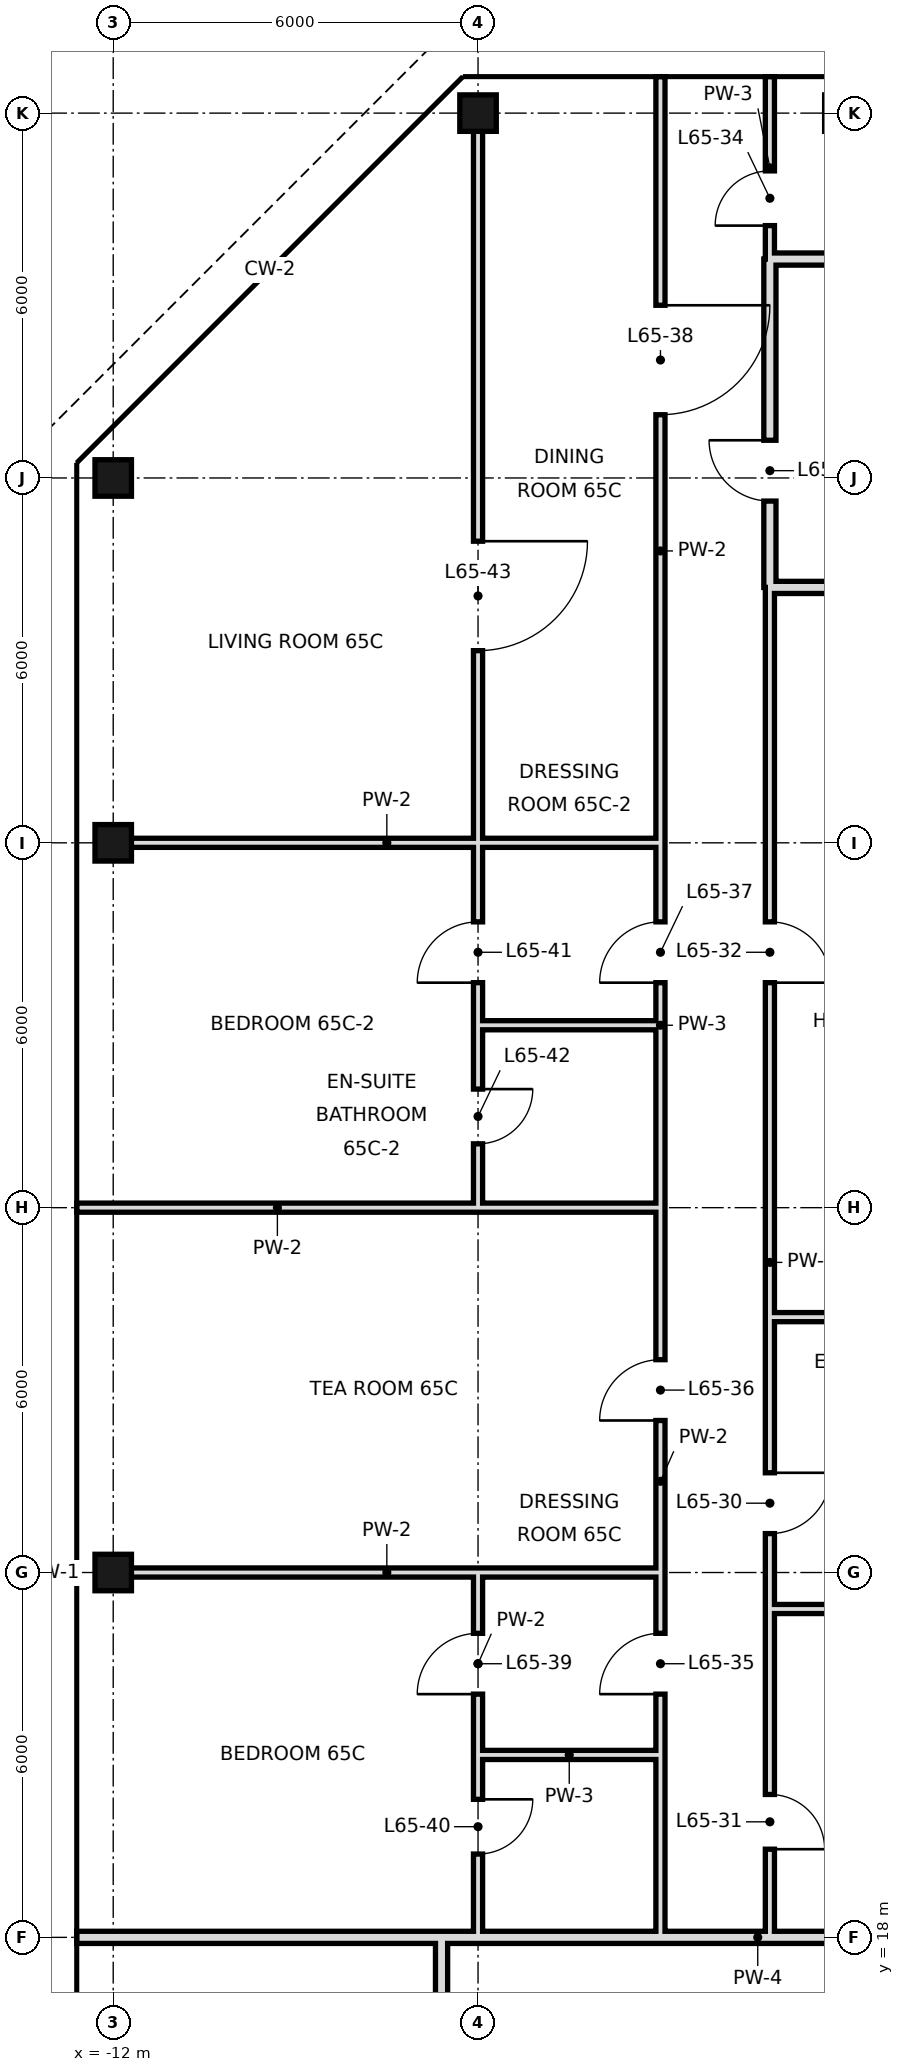
"""IFC4 building model, lengths in metres.
Left out: names, types, materials, properties, quantities, classifications, styles, units other than length and angle.
Written with IfcOpenShell. Run it as: python <this file> out.ifc"""

import sys

from ifc_helpers import new_model, si_unit, direction, frame, frame_2d, origin, origin_2d, place, context, subcontext, project, spatial, rectangle, hollow_rectangle, extrude, element, fill, save


model = new_model("IFC4")
c1 = context("Model", 3, precision=1e-05, world=origin(), true_north=direction((0.0, 1.0)))
c2 = subcontext(c1, "Body", "Model", "MODEL_VIEW")
j1 = project(units=[si_unit("LENGTHUNIT", "METRE"), si_unit("PLANEANGLEUNIT", "RADIAN")], contexts=[c1])
p1 = place(None, origin())
s1 = spatial("IfcSite", under=j1, at=p1, CompositionType="ELEMENT")
p2 = place(p1, origin())
s2 = spatial("IfcBuilding", under=s1, at=p2, CompositionType="ELEMENT")
p3 = place(p2, frame((0.0, 0.0, 273.8)))
s3 = spatial("IfcBuildingStorey", under=s2, at=p3, CompositionType="ELEMENT", Elevation=273.8)
for number, where, z_axis, x_axis in (
    (1, (-12.0, 24.0, 0.0), (0.0, 0.0, 1.0), (1.0, 0.0, 0.0)),
    (2, (-12.0, 36.0, 0.0), (0.0, 0.0, 1.0), (1.0, 0.0, 0.0)),
    (3, (-12.0, 42.0, 0.0), (0.0, 0.0, 1.0), (1.0, 0.0, 0.0)),
    (4, (-6.0, 48.0, 0.0), (0.0, 0.0, 1.0), (1.0, 0.0, 0.0)),
):
    element("IfcColumn", number, at=place(p3, frame(where, z_axis=z_axis, x_axis=x_axis)), inside=s3, PredefinedType="COLUMN", context=c2, shape_type="SweptSolid", body=[
        extrude(hollow_rectangle(XDim=0.6, YDim=0.6, WallThickness=0.028, at=origin_2d()), origin(), (0.0, 0.0, 1.0), 3.6),
    ])
p4 = place(p3, frame((-1.2, 40.2, 0.0), z_axis=(0.0, 0.0, 1.0), x_axis=(0.0, 1.0, 0.0)))
e5 = element("IfcWall", 5, at=p4, inside=s3, PredefinedType="SOLIDWALL", context=c2, shape_type="SweptSolid", body=[
    extrude(rectangle(XDim=5.4, YDim=0.2, at=frame_2d((2.7, 0.0))), origin(), (0.0, 0.0, 1.0), 2.72),
])
p5 = place(p4, frame((1.42, 0.0, 0.0)))
e6 = element("IfcOpeningElement", 6, at=p5, cuts=e5, PredefinedType="OPENING", context=c2, shape_type="SweptSolid", body=[
    extrude(rectangle(XDim=1.0, YDim=2.4, at=frame_2d((0.5, 1.2))), frame((0.0, 0.11, 0.0), z_axis=(0.0, -1.0, 0.0), x_axis=(1.0, 0.0, 0.0)), (0.0, 0.0, 1.0), 0.22),
])
p6 = place(p3, frame((-1.2, 18.0, 0.0), z_axis=(0.0, 0.0, 1.0), x_axis=(0.0, 1.0, 0.0)))
e7 = element("IfcWall", 7, at=p6, inside=s3, PredefinedType="PARTITIONING", context=c2, shape_type="SweptSolid", body=[
    extrude(rectangle(XDim=22.2, YDim=0.15, at=frame_2d((11.1, 0.0))), origin(), (0.0, 0.0, 1.0), 3.42),
])
p7 = place(p6, frame((6.64, 0.0, 0.0)))
e8 = element("IfcOpeningElement", 8, at=p7, cuts=e7, PredefinedType="OPENING", context=c2, shape_type="SweptSolid", body=[
    extrude(rectangle(XDim=1.0, YDim=2.4, at=frame_2d((0.5, 1.2))), frame((0.0, 0.085, 0.0), z_axis=(0.0, -1.0, 0.0), x_axis=(1.0, 0.0, 0.0)), (0.0, 0.0, 1.0), 0.17),
])
p8 = place(p6, frame((1.45, 0.0, 0.0)))
e9 = element("IfcOpeningElement", 9, at=p8, cuts=e7, PredefinedType="OPENING", context=c2, shape_type="SweptSolid", body=[
    extrude(rectangle(XDim=0.9, YDim=2.1, at=frame_2d((0.45, 1.05))), frame((0.0, 0.085, 0.0), z_axis=(0.0, -1.0, 0.0), x_axis=(1.0, 0.0, 0.0)), (0.0, 0.0, 1.0), 0.17),
])
p9 = place(p6, frame((15.7, 0.0, 0.0)))
e10 = element("IfcOpeningElement", 10, at=p9, cuts=e7, PredefinedType="OPENING", context=c2, shape_type="SweptSolid", body=[
    extrude(rectangle(XDim=1.0, YDim=2.4, at=frame_2d((0.5, 1.2))), frame((0.0, 0.085, 0.0), z_axis=(0.0, -1.0, 0.0), x_axis=(1.0, 0.0, 0.0)), (0.0, 0.0, 1.0), 0.17),
])
p10 = place(p3, frame((-1.2, 45.6, 0.0), z_axis=(0.0, 0.0, 1.0), x_axis=(0.0, 1.0, 0.0)))
e11 = element("IfcWall", 11, at=p10, inside=s3, PredefinedType="PARTITIONING", context=c2, shape_type="SweptSolid", body=[
    extrude(rectangle(XDim=3.0, YDim=0.15, at=frame_2d((1.5, 0.0))), origin(), (0.0, 0.0, 1.0), 3.42),
])
p11 = place(p10, frame((0.55, 0.0, 0.0)))
e12 = element("IfcOpeningElement", 12, at=p11, cuts=e11, PredefinedType="OPENING", context=c2, shape_type="SweptSolid", body=[
    extrude(rectangle(XDim=0.9, YDim=2.4, at=frame_2d((0.45, 1.2))), frame((0.0, 0.085, 0.0), z_axis=(0.0, -1.0, 0.0), x_axis=(1.0, 0.0, 0.0)), (0.0, 0.0, 1.0), 0.17),
])
p12 = place(p3, frame((-3.0, 21.0, 0.0), z_axis=(0.0, 0.0, 1.0), x_axis=(0.0, 1.0, 0.0)))
e13 = element("IfcWall", 13, at=p12, inside=s3, PredefinedType="PARTITIONING", context=c2, shape_type="SweptSolid", body=[
    extrude(rectangle(XDim=9.0, YDim=0.15, at=frame_2d((4.5, 0.0))), origin(), (0.0, 0.0, 1.0), 3.42),
])
p13 = place(p12, frame((1.0, 0.0, 0.0)))
e14 = element("IfcOpeningElement", 14, at=p13, cuts=e13, PredefinedType="OPENING", context=c2, shape_type="SweptSolid", body=[
    extrude(rectangle(XDim=1.0, YDim=2.4, at=frame_2d((0.5, 1.2))), frame((0.0, 0.085, 0.0), z_axis=(0.0, -1.0, 0.0), x_axis=(1.0, 0.0, 0.0)), (0.0, 0.0, 1.0), 0.17),
])
p14 = place(p12, frame((5.5, 0.0, 0.0)))
e15 = element("IfcOpeningElement", 15, at=p14, cuts=e13, PredefinedType="OPENING", context=c2, shape_type="SweptSolid", body=[
    extrude(rectangle(XDim=1.0, YDim=2.4, at=frame_2d((0.5, 1.2))), frame((0.0, 0.085, 0.0), z_axis=(0.0, -1.0, 0.0), x_axis=(1.0, 0.0, 0.0)), (0.0, 0.0, 1.0), 0.17),
])
p15 = place(p3, frame((-3.0, 33.0, 0.0), z_axis=(0.0, 0.0, 1.0), x_axis=(0.0, 1.0, 0.0)))
e16 = element("IfcWall", 16, at=p15, inside=s3, PredefinedType="PARTITIONING", context=c2, shape_type="SweptSolid", body=[
    extrude(rectangle(XDim=15.6, YDim=0.15, at=frame_2d((7.8, 0.0))), origin(), (0.0, 0.0, 1.0), 3.42),
])
p16 = place(p15, frame((0.7, 0.0, 0.0)))
e17 = element("IfcOpeningElement", 17, at=p16, cuts=e16, PredefinedType="OPENING", context=c2, shape_type="SweptSolid", body=[
    extrude(rectangle(XDim=1.0, YDim=2.4, at=frame_2d((0.5, 1.2))), frame((0.0, 0.085, 0.0), z_axis=(0.0, -1.0, 0.0), x_axis=(1.0, 0.0, 0.0)), (0.0, 0.0, 1.0), 0.17),
])
p17 = place(p15, frame((10.04, 0.0, 0.0)))
e18 = element("IfcOpeningElement", 18, at=p17, cuts=e16, PredefinedType="OPENING", context=c2, shape_type="SweptSolid", body=[
    extrude(rectangle(XDim=1.8, YDim=2.4, at=frame_2d((0.9, 1.2))), frame((0.0, 0.085, 0.0), z_axis=(0.0, -1.0, 0.0), x_axis=(1.0, 0.0, 0.0)), (0.0, 0.0, 1.0), 0.17),
])
for number, where, z_axis, x_axis in (
    (19, (-3.0, 18.0, 0.0), (0.0, 0.0, 1.0), (0.0, 1.0, 0.0)),
    (20, (-3.0, 30.0, 0.0), (0.0, 0.0, 1.0), (0.0, 1.0, 0.0)),
):
    element("IfcWall", number, at=place(p3, frame(where, z_axis=z_axis, x_axis=x_axis)), inside=s3, PredefinedType="PARTITIONING", context=c2, shape_type="SweptSolid", body=[
        extrude(rectangle(XDim=3.0, YDim=0.15, at=frame_2d((1.5, 0.0))), origin(), (0.0, 0.0, 1.0), 3.42),
    ])
p18 = place(p3, frame((-6.0, 21.0, 0.0), z_axis=(0.0, 0.0, 1.0), x_axis=(0.0, 1.0, 0.0)))
e21 = element("IfcWall", 21, at=p18, inside=s3, PredefinedType="PARTITIONING", context=c2, shape_type="SweptSolid", body=[
    extrude(rectangle(XDim=3.0, YDim=0.15, at=frame_2d((1.5, 0.0))), origin(), (0.0, 0.0, 1.0), 3.42),
])
p19 = place(p18, frame((1.0, 0.0, 0.0)))
e22 = element("IfcOpeningElement", 22, at=p19, cuts=e21, PredefinedType="OPENING", context=c2, shape_type="SweptSolid", body=[
    extrude(rectangle(XDim=1.0, YDim=2.4, at=frame_2d((0.5, 1.2))), frame((0.0, 0.085, 0.0), z_axis=(0.0, -1.0, 0.0), x_axis=(1.0, 0.0, 0.0)), (0.0, 0.0, 1.0), 0.17),
])
p20 = place(p3, frame((-6.0, 33.0, 0.0), z_axis=(0.0, 0.0, 1.0), x_axis=(0.0, 1.0, 0.0)))
e23 = element("IfcWall", 23, at=p20, inside=s3, PredefinedType="PARTITIONING", context=c2, shape_type="SweptSolid", body=[
    extrude(rectangle(XDim=15.0, YDim=0.15, at=frame_2d((7.5, 0.0))), origin(), (0.0, 0.0, 1.0), 3.42),
])
p21 = place(p20, frame((0.7, 0.0, 0.0)))
e24 = element("IfcOpeningElement", 24, at=p21, cuts=e23, PredefinedType="OPENING", context=c2, shape_type="SweptSolid", body=[
    extrude(rectangle(XDim=1.0, YDim=2.4, at=frame_2d((0.5, 1.2))), frame((0.0, 0.085, 0.0), z_axis=(0.0, -1.0, 0.0), x_axis=(1.0, 0.0, 0.0)), (0.0, 0.0, 1.0), 0.17),
])
p22 = place(p20, frame((6.16, 0.0, 0.0)))
e25 = element("IfcOpeningElement", 25, at=p22, cuts=e23, PredefinedType="OPENING", context=c2, shape_type="SweptSolid", body=[
    extrude(rectangle(XDim=1.8, YDim=2.4, at=frame_2d((0.9, 1.2))), frame((0.0, 0.085, 0.0), z_axis=(0.0, -1.0, 0.0), x_axis=(1.0, 0.0, 0.0)), (0.0, 0.0, 1.0), 0.17),
])
p23 = place(p3, frame((-6.0, 18.0, 0.0), z_axis=(0.0, 0.0, 1.0), x_axis=(0.0, 1.0, 0.0)))
e26 = element("IfcWall", 26, at=p23, inside=s3, PredefinedType="PARTITIONING", context=c2, shape_type="SweptSolid", body=[
    extrude(rectangle(XDim=3.0, YDim=0.15, at=frame_2d((1.5, 0.0))), origin(), (0.0, 0.0, 1.0), 3.42),
])
p24 = place(p23, frame((1.37, 0.0, 0.0)))
e27 = element("IfcOpeningElement", 27, at=p24, cuts=e26, PredefinedType="OPENING", context=c2, shape_type="SweptSolid", body=[
    extrude(rectangle(XDim=0.9, YDim=2.4, at=frame_2d((0.45, 1.2))), frame((0.0, 0.085, 0.0), z_axis=(0.0, -1.0, 0.0), x_axis=(1.0, 0.0, 0.0)), (0.0, 0.0, 1.0), 0.17),
])
p25 = place(p3, frame((-6.0, 30.0, 0.0), z_axis=(0.0, 0.0, 1.0), x_axis=(0.0, 1.0, 0.0)))
e28 = element("IfcWall", 28, at=p25, inside=s3, PredefinedType="PARTITIONING", context=c2, shape_type="SweptSolid", body=[
    extrude(rectangle(XDim=3.0, YDim=0.15, at=frame_2d((1.5, 0.0))), origin(), (0.0, 0.0, 1.0), 3.42),
])
p26 = place(p25, frame((1.05, 0.0, 0.0)))
e29 = element("IfcOpeningElement", 29, at=p26, cuts=e28, PredefinedType="OPENING", context=c2, shape_type="SweptSolid", body=[
    extrude(rectangle(XDim=0.9, YDim=2.4, at=frame_2d((0.45, 1.2))), frame((0.0, 0.085, 0.0), z_axis=(0.0, -1.0, 0.0), x_axis=(1.0, 0.0, 0.0)), (0.0, 0.0, 1.0), 0.17),
])
p27 = place(p3, frame((-6.6, 10.8, 0.0), z_axis=(0.0, 0.0, 1.0), x_axis=(0.0, 1.0, 0.0)))
e30 = element("IfcWall", 30, at=p27, inside=s3, PredefinedType="SOLIDWALL", context=c2, shape_type="SweptSolid", body=[
    extrude(rectangle(XDim=7.2, YDim=0.2, at=frame_2d((3.6, 0.0))), origin(), (0.0, 0.0, 1.0), 2.72),
])
p28 = place(p3, frame((-12.6, 18.0, 0.0), z_axis=(0.0, 0.0, 1.0), x_axis=(1.0, 0.0, 0.0)))
e31 = element("IfcWall", 31, at=p28, inside=s3, PredefinedType="SOLIDWALL", context=c2, shape_type="SweptSolid", body=[
    extrude(rectangle(XDim=6.0, YDim=0.2, at=frame_2d((3.0, 0.0))), origin(), (0.0, 0.0, 1.0), 2.72),
])
p29 = place(p3, frame((-6.6, 18.0, 0.0), z_axis=(0.0, 0.0, 1.0), x_axis=(1.0, 0.0, 0.0)))
e32 = element("IfcWall", 32, at=p29, inside=s3, PredefinedType="SOLIDWALL", context=c2, shape_type="SweptSolid", body=[
    extrude(rectangle(XDim=9.7, YDim=0.2, at=frame_2d((4.85, 0.0))), origin(), (0.0, 0.0, 1.0), 2.72),
])
p30 = place(p3, frame((-6.0, 21.0, 0.0), z_axis=(0.0, 0.0, 1.0), x_axis=(1.0, 0.0, 0.0)))
e33 = element("IfcWall", 33, at=p30, inside=s3, PredefinedType="PARTITIONING", context=c2, shape_type="SweptSolid", body=[
    extrude(rectangle(XDim=3.0, YDim=0.15, at=frame_2d((1.5, 0.0))), origin(), (0.0, 0.0, 1.0), 3.42),
])
p31 = place(p3, frame((-1.2, 23.4, 0.0), z_axis=(0.0, 0.0, 1.0), x_axis=(1.0, 0.0, 0.0)))
e34 = element("IfcWall", 34, at=p31, inside=s3, PredefinedType="PARTITIONING", context=c2, shape_type="SweptSolid", body=[
    extrude(rectangle(XDim=4.3, YDim=0.15, at=frame_2d((2.15, 0.0))), origin(), (0.0, 0.0, 1.0), 3.42),
])
p32 = place(p3, frame((-12.0, 24.0, 0.0), z_axis=(0.0, 0.0, 1.0), x_axis=(1.0, 0.0, 0.0)))
e35 = element("IfcWall", 35, at=p32, inside=s3, PredefinedType="PARTITIONING", context=c2, shape_type="SweptSolid", body=[
    extrude(rectangle(XDim=9.0, YDim=0.15, at=frame_2d((4.5, 0.0))), origin(), (0.0, 0.0, 1.0), 2.72),
])
p33 = place(p3, frame((-1.2, 28.2, 0.0), z_axis=(0.0, 0.0, 1.0), x_axis=(1.0, 0.0, 0.0)))
e36 = element("IfcWall", 36, at=p33, inside=s3, PredefinedType="PARTITIONING", context=c2, shape_type="SweptSolid", body=[
    extrude(rectangle(XDim=4.3, YDim=0.15, at=frame_2d((2.15, 0.0))), origin(), (0.0, 0.0, 1.0), 3.42),
])
p34 = place(p3, frame((-12.6, 30.0, 0.0), z_axis=(0.0, 0.0, 1.0), x_axis=(1.0, 0.0, 0.0)))
e37 = element("IfcWall", 37, at=p34, inside=s3, PredefinedType="PARTITIONING", context=c2, shape_type="SweptSolid", body=[
    extrude(rectangle(XDim=6.6, YDim=0.15, at=frame_2d((3.3, 0.0))), origin(), (0.0, 0.0, 1.0), 2.72),
])
p35 = place(p3, frame((-6.0, 30.0, 0.0), z_axis=(0.0, 0.0, 1.0), x_axis=(1.0, 0.0, 0.0)))
e38 = element("IfcWall", 38, at=p35, inside=s3, PredefinedType="PARTITIONING", context=c2, shape_type="SweptSolid", body=[
    extrude(rectangle(XDim=3.0, YDim=0.15, at=frame_2d((1.5, 0.0))), origin(), (0.0, 0.0, 1.0), 2.72),
])
p36 = place(p3, frame((-6.0, 33.0, 0.0), z_axis=(0.0, 0.0, 1.0), x_axis=(1.0, 0.0, 0.0)))
e39 = element("IfcWall", 39, at=p36, inside=s3, PredefinedType="PARTITIONING", context=c2, shape_type="SweptSolid", body=[
    extrude(rectangle(XDim=3.0, YDim=0.15, at=frame_2d((1.5, 0.0))), origin(), (0.0, 0.0, 1.0), 3.42),
])
p37 = place(p3, frame((-12.0, 36.0, 0.0), z_axis=(0.0, 0.0, 1.0), x_axis=(1.0, 0.0, 0.0)))
e40 = element("IfcWall", 40, at=p37, inside=s3, PredefinedType="PARTITIONING", context=c2, shape_type="SweptSolid", body=[
    extrude(rectangle(XDim=9.0, YDim=0.15, at=frame_2d((4.5, 0.0))), origin(), (0.0, 0.0, 1.0), 2.72),
])
for number, where, z_axis, x_axis in (
    (41, (-1.2, 40.2, 0.0), (0.0, 0.0, 1.0), (1.0, 0.0, 0.0)),
    (42, (-1.2, 45.6, 0.0), (0.0, 0.0, 1.0), (1.0, 0.0, 0.0)),
):
    element("IfcWall", number, at=place(p3, frame(where, z_axis=z_axis, x_axis=x_axis)), inside=s3, PredefinedType="SOLIDWALL", context=c2, shape_type="SweptSolid", body=[
        extrude(rectangle(XDim=4.3, YDim=0.2, at=frame_2d((2.15, 0.0))), origin(), (0.0, 0.0, 1.0), 2.72),
    ])
p38 = place(p7, origin())
e43 = element("IfcDoor", 43, at=p38, inside=s3, OperationType="SINGLE_SWING_RIGHT", PredefinedType="DOOR", context=c2, shape_type="SweptSolid", body=[
    extrude(rectangle(XDim=1.0, YDim=2.4, at=frame_2d((0.5, 1.2))), frame((0.0, 0.025, 0.0), z_axis=(0.0, -1.0, 0.0), x_axis=(1.0, 0.0, 0.0)), (0.0, 0.0, 1.0), 0.05),
])
fill(e8, e43)
p39 = place(p8, frame((0.9, 0.0, 0.0), z_axis=(0.0, 0.0, 1.0), x_axis=(-1.0, 0.0, 0.0)))
e44 = element("IfcDoor", 44, at=p39, inside=s3, OperationType="SINGLE_SWING_RIGHT", PredefinedType="DOOR", context=c2, shape_type="SweptSolid", body=[
    extrude(rectangle(XDim=0.9, YDim=2.1, at=frame_2d((0.45, 1.05))), frame((0.0, 0.025, 0.0), z_axis=(0.0, -1.0, 0.0), x_axis=(1.0, 0.0, 0.0)), (0.0, 0.0, 1.0), 0.05),
])
fill(e9, e44)
p40 = place(p9, frame((1.0, 0.0, 0.0), z_axis=(0.0, 0.0, 1.0), x_axis=(-1.0, 0.0, 0.0)))
e45 = element("IfcDoor", 45, at=p40, inside=s3, OperationType="SINGLE_SWING_RIGHT", PredefinedType="DOOR", context=c2, shape_type="SweptSolid", body=[
    extrude(rectangle(XDim=1.0, YDim=2.4, at=frame_2d((0.5, 1.2))), frame((0.0, 0.025, 0.0), z_axis=(0.0, -1.0, 0.0), x_axis=(1.0, 0.0, 0.0)), (0.0, 0.0, 1.0), 0.05),
])
fill(e10, e45)
p41 = place(p5, frame((1.0, 0.0, 0.0), z_axis=(0.0, 0.0, 1.0), x_axis=(-1.0, 0.0, 0.0)))
e46 = element("IfcDoor", 46, at=p41, inside=s3, OperationType="SINGLE_SWING_LEFT", PredefinedType="DOOR", context=c2, shape_type="SweptSolid", body=[
    extrude(rectangle(XDim=1.0, YDim=2.4, at=frame_2d((0.5, 1.2))), frame((0.0, 0.025, 0.0), z_axis=(0.0, -1.0, 0.0), x_axis=(1.0, 0.0, 0.0)), (0.0, 0.0, 1.0), 0.05),
])
fill(e6, e46)
p42 = place(p11, origin())
e47 = element("IfcDoor", 47, at=p42, inside=s3, OperationType="SINGLE_SWING_LEFT", PredefinedType="DOOR", context=c2, shape_type="SweptSolid", body=[
    extrude(rectangle(XDim=0.9, YDim=2.4, at=frame_2d((0.45, 1.2))), frame((0.0, 0.025, 0.0), z_axis=(0.0, -1.0, 0.0), x_axis=(1.0, 0.0, 0.0)), (0.0, 0.0, 1.0), 0.05),
])
fill(e12, e47)
p43 = place(p13, origin())
e48 = element("IfcDoor", 48, at=p43, inside=s3, OperationType="SINGLE_SWING_LEFT", PredefinedType="DOOR", context=c2, shape_type="SweptSolid", body=[
    extrude(rectangle(XDim=1.0, YDim=2.4, at=frame_2d((0.5, 1.2))), frame((0.0, 0.025, 0.0), z_axis=(0.0, -1.0, 0.0), x_axis=(1.0, 0.0, 0.0)), (0.0, 0.0, 1.0), 0.05),
])
fill(e14, e48)
p44 = place(p14, origin())
e49 = element("IfcDoor", 49, at=p44, inside=s3, OperationType="SINGLE_SWING_LEFT", PredefinedType="DOOR", context=c2, shape_type="SweptSolid", body=[
    extrude(rectangle(XDim=1.0, YDim=2.4, at=frame_2d((0.5, 1.2))), frame((0.0, 0.025, 0.0), z_axis=(0.0, -1.0, 0.0), x_axis=(1.0, 0.0, 0.0)), (0.0, 0.0, 1.0), 0.05),
])
fill(e15, e49)
p45 = place(p16, origin())
e50 = element("IfcDoor", 50, at=p45, inside=s3, OperationType="SINGLE_SWING_LEFT", PredefinedType="DOOR", context=c2, shape_type="SweptSolid", body=[
    extrude(rectangle(XDim=1.0, YDim=2.4, at=frame_2d((0.5, 1.2))), frame((0.0, 0.025, 0.0), z_axis=(0.0, -1.0, 0.0), x_axis=(1.0, 0.0, 0.0)), (0.0, 0.0, 1.0), 0.05),
])
fill(e17, e50)
p46 = place(p17, origin())
e51 = element("IfcDoor", 51, at=p46, inside=s3, OperationType="SINGLE_SWING_RIGHT", PredefinedType="DOOR", context=c2, shape_type="SweptSolid", body=[
    extrude(rectangle(XDim=1.8, YDim=2.4, at=frame_2d((0.9, 1.2))), frame((0.0, 0.025, 0.0), z_axis=(0.0, -1.0, 0.0), x_axis=(1.0, 0.0, 0.0)), (0.0, 0.0, 1.0), 0.05),
])
fill(e18, e51)
p47 = place(p19, origin())
e52 = element("IfcDoor", 52, at=p47, inside=s3, OperationType="SINGLE_SWING_LEFT", PredefinedType="DOOR", context=c2, shape_type="SweptSolid", body=[
    extrude(rectangle(XDim=1.0, YDim=2.4, at=frame_2d((0.5, 1.2))), frame((0.0, 0.025, 0.0), z_axis=(0.0, -1.0, 0.0), x_axis=(1.0, 0.0, 0.0)), (0.0, 0.0, 1.0), 0.05),
])
fill(e22, e52)
p48 = place(p24, origin())
e53 = element("IfcDoor", 53, at=p48, inside=s3, OperationType="SINGLE_SWING_RIGHT", PredefinedType="DOOR", context=c2, shape_type="SweptSolid", body=[
    extrude(rectangle(XDim=0.9, YDim=2.4, at=frame_2d((0.45, 1.2))), frame((0.0, 0.025, 0.0), z_axis=(0.0, -1.0, 0.0), x_axis=(1.0, 0.0, 0.0)), (0.0, 0.0, 1.0), 0.05),
])
fill(e27, e53)
p49 = place(p21, origin())
e54 = element("IfcDoor", 54, at=p49, inside=s3, OperationType="SINGLE_SWING_LEFT", PredefinedType="DOOR", context=c2, shape_type="SweptSolid", body=[
    extrude(rectangle(XDim=1.0, YDim=2.4, at=frame_2d((0.5, 1.2))), frame((0.0, 0.025, 0.0), z_axis=(0.0, -1.0, 0.0), x_axis=(1.0, 0.0, 0.0)), (0.0, 0.0, 1.0), 0.05),
])
fill(e24, e54)
p50 = place(p26, origin())
e55 = element("IfcDoor", 55, at=p50, inside=s3, OperationType="SINGLE_SWING_RIGHT", PredefinedType="DOOR", context=c2, shape_type="SweptSolid", body=[
    extrude(rectangle(XDim=0.9, YDim=2.4, at=frame_2d((0.45, 1.2))), frame((0.0, 0.025, 0.0), z_axis=(0.0, -1.0, 0.0), x_axis=(1.0, 0.0, 0.0)), (0.0, 0.0, 1.0), 0.05),
])
fill(e29, e55)
p51 = place(p22, origin())
e56 = element("IfcDoor", 56, at=p51, inside=s3, OperationType="SINGLE_SWING_RIGHT", PredefinedType="DOOR", context=c2, shape_type="SweptSolid", body=[
    extrude(rectangle(XDim=1.8, YDim=2.4, at=frame_2d((0.9, 1.2))), frame((0.0, 0.025, 0.0), z_axis=(0.0, -1.0, 0.0), x_axis=(1.0, 0.0, 0.0)), (0.0, 0.0, 1.0), 0.05),
])
fill(e25, e56)
save(model, sys.argv[1])
